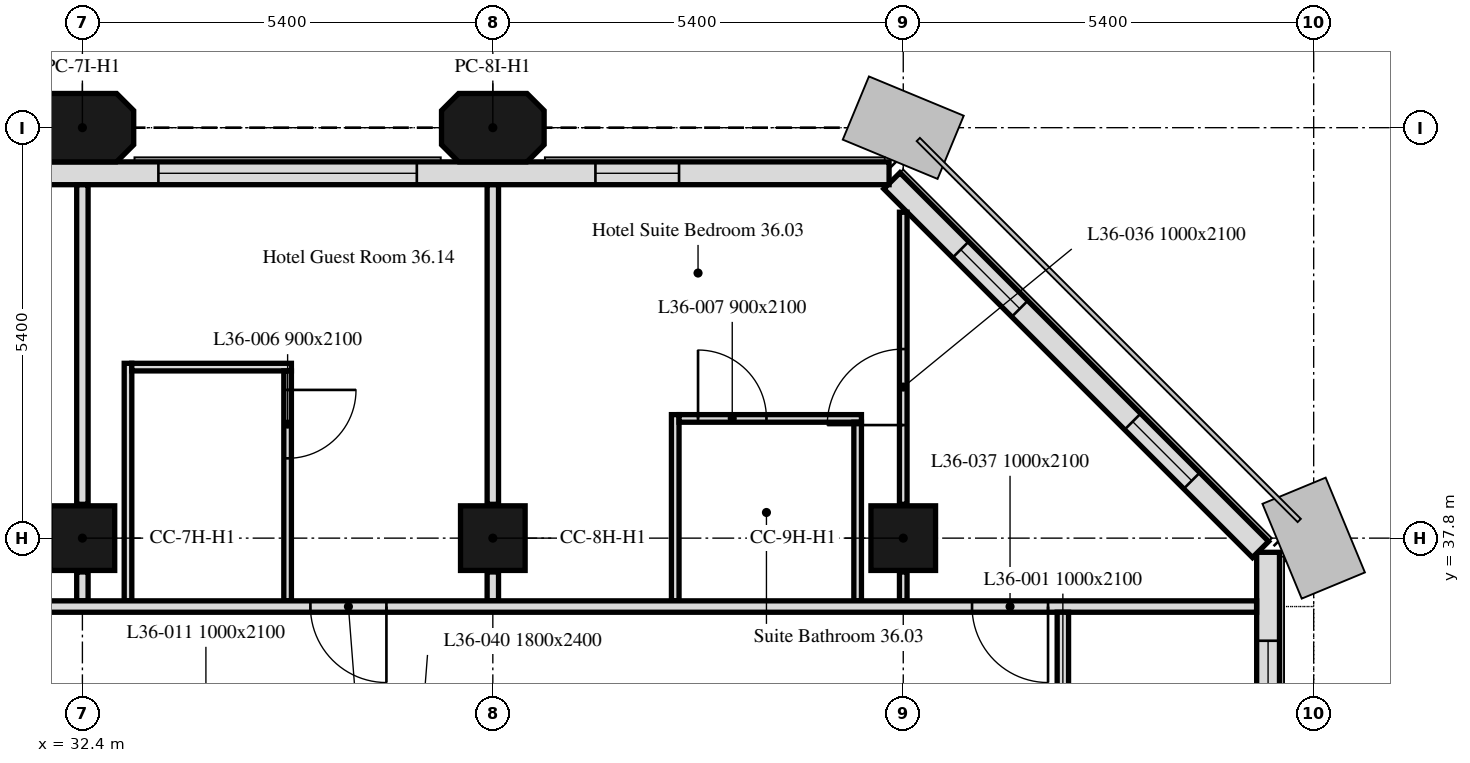
"""IFC4 building model, lengths in metres.
Left out: names, types, materials, properties, quantities, classifications, styles, units other than length and angle.
Written with IfcOpenShell. Run it as: python <this file> out.ifc"""

import sys

from ifc_helpers import new_model, si_unit, direction, frame, frame_2d, origin, origin_2d, place, context, subcontext, project, spatial, polyline, rectangle, outline, extrude, element, fill, save


model = new_model("IFC4")
c1 = context("Model", 3, precision=1e-05, world=origin(), true_north=direction((0.0, 1.0)))
c2 = subcontext(c1, "Body", "Model", "MODEL_VIEW")
j1 = project(units=[si_unit("LENGTHUNIT", "METRE"), si_unit("PLANEANGLEUNIT", "RADIAN")], contexts=[c1])
p1 = place(None, origin())
s1 = spatial("IfcSite", under=j1, at=p1, CompositionType="ELEMENT")
p2 = place(p1, origin())
s2 = spatial("IfcBuilding", under=s1, at=p2, CompositionType="ELEMENT")
p3 = place(p2, frame((0.0, 0.0, 156.1)))
s3 = spatial("IfcBuildingStorey", under=s2, at=p3, CompositionType="ELEMENT", Elevation=156.1)
for number, where, z_axis, x_axis in (
    (1, (32.4, 37.8, 0.0), (0.0, 0.0, 1.0), (1.0, 0.0, 0.0)),
    (2, (37.8, 37.8, 0.0), (0.0, 0.0, 1.0), (1.0, 0.0, 0.0)),
    (3, (43.2, 37.8, 0.0), (0.0, 0.0, 1.0), (1.0, 0.0, 0.0)),
):
    element("IfcColumn", number, at=place(p3, frame(where, z_axis=z_axis, x_axis=x_axis)), inside=s3, PredefinedType="COLUMN", context=c2, shape_type="SweptSolid", body=[
        extrude(rectangle(XDim=0.85, YDim=0.85, at=origin_2d()), origin(), (0.0, 0.0, 1.0), 3.0),
    ])
for number, where, z_axis, x_axis in (
    (4, (32.4, 43.2, 0.0), (0.0, 0.0, 1.0), (1.0, 0.0, 0.0)),
    (5, (37.8, 43.2, 0.0), (0.0, 0.0, 1.0), (1.0, 0.0, 0.0)),
):
    element("IfcColumn", number, at=place(p3, frame(where, z_axis=z_axis, x_axis=x_axis)), inside=s3, PredefinedType="COLUMN", context=c2, shape_type="SweptSolid", body=[
        extrude(outline(polyline([(-0.45, -0.45), (0.45, -0.45), (0.675, -0.225), (0.675, 0.225), (0.45, 0.45), (-0.45, 0.45), (-0.675, 0.225), (-0.675, -0.225), (-0.45, -0.45)])), origin(), (0.0, 0.0, 1.0), 3.0),
    ])
p4 = place(p3, frame((48.0, 5.586, 0.0), z_axis=(0.0, 0.0, 1.0), x_axis=(0.0, 1.0, 0.0)))
e6 = element("IfcWall", 6, at=p4, inside=s3, PredefinedType="SOLIDWALL", context=c2, shape_type="SweptSolid", body=[
    extrude(rectangle(XDim=32.027, YDim=0.3, at=frame_2d((16.014, 0.0))), origin(), (0.0, 0.0, 1.0), 3.0),
])
p5 = place(p4, frame((1.789, 0.0, 0.9)))
e7 = element("IfcOpeningElement", 7, at=p5, cuts=e6, PredefinedType="OPENING", context=c2, shape_type="SweptSolid", body=[
    extrude(rectangle(XDim=0.65, YDim=1.7, at=frame_2d((0.325, 0.85))), frame((0.0, 0.16, 0.0), z_axis=(0.0, -1.0, 0.0), x_axis=(1.0, 0.0, 0.0)), (0.0, 0.0, 1.0), 0.32),
])
p6 = place(p4, frame((2.764, 0.0, 0.9)))
e8 = element("IfcOpeningElement", 8, at=p6, cuts=e6, PredefinedType="OPENING", context=c2, shape_type="SweptSolid", body=[
    extrude(rectangle(XDim=1.1, YDim=1.7, at=frame_2d((0.55, 0.85))), frame((0.0, 0.16, 0.0), z_axis=(0.0, -1.0, 0.0), x_axis=(1.0, 0.0, 0.0)), (0.0, 0.0, 1.0), 0.32),
])
p7 = place(p4, frame((6.214, 0.0, 0.9)))
e9 = element("IfcOpeningElement", 9, at=p7, cuts=e6, PredefinedType="OPENING", context=c2, shape_type="SweptSolid", body=[
    extrude(rectangle(XDim=3.4, YDim=1.7, at=frame_2d((1.7, 0.85))), frame((0.0, 0.16, 0.0), z_axis=(0.0, -1.0, 0.0), x_axis=(1.0, 0.0, 0.0)), (0.0, 0.0, 1.0), 0.32),
])
p8 = place(p4, frame((11.964, 0.0, 0.9)))
e10 = element("IfcOpeningElement", 10, at=p8, cuts=e6, PredefinedType="OPENING", context=c2, shape_type="SweptSolid", body=[
    extrude(rectangle(XDim=1.1, YDim=1.7, at=frame_2d((0.55, 0.85))), frame((0.0, 0.16, 0.0), z_axis=(0.0, -1.0, 0.0), x_axis=(1.0, 0.0, 0.0)), (0.0, 0.0, 1.0), 0.32),
])
p9 = place(p4, frame((13.564, 0.0, 0.9)))
e11 = element("IfcOpeningElement", 11, at=p9, cuts=e6, PredefinedType="OPENING", context=c2, shape_type="SweptSolid", body=[
    extrude(rectangle(XDim=1.1, YDim=1.7, at=frame_2d((0.55, 0.85))), frame((0.0, 0.16, 0.0), z_axis=(0.0, -1.0, 0.0), x_axis=(1.0, 0.0, 0.0)), (0.0, 0.0, 1.0), 0.32),
])
p10 = place(p4, frame((17.364, 0.0, 0.9)))
e12 = element("IfcOpeningElement", 12, at=p10, cuts=e6, PredefinedType="OPENING", context=c2, shape_type="SweptSolid", body=[
    extrude(rectangle(XDim=1.1, YDim=1.7, at=frame_2d((0.55, 0.85))), frame((0.0, 0.16, 0.0), z_axis=(0.0, -1.0, 0.0), x_axis=(1.0, 0.0, 0.0)), (0.0, 0.0, 1.0), 0.32),
])
p11 = place(p4, frame((18.964, 0.0, 0.9)))
e13 = element("IfcOpeningElement", 13, at=p11, cuts=e6, PredefinedType="OPENING", context=c2, shape_type="SweptSolid", body=[
    extrude(rectangle(XDim=1.1, YDim=1.7, at=frame_2d((0.55, 0.85))), frame((0.0, 0.16, 0.0), z_axis=(0.0, -1.0, 0.0), x_axis=(1.0, 0.0, 0.0)), (0.0, 0.0, 1.0), 0.32),
])
p12 = place(p4, frame((22.764, 0.0, 0.9)))
e14 = element("IfcOpeningElement", 14, at=p12, cuts=e6, PredefinedType="OPENING", context=c2, shape_type="SweptSolid", body=[
    extrude(rectangle(XDim=1.1, YDim=1.7, at=frame_2d((0.55, 0.85))), frame((0.0, 0.16, 0.0), z_axis=(0.0, -1.0, 0.0), x_axis=(1.0, 0.0, 0.0)), (0.0, 0.0, 1.0), 0.32),
])
p13 = place(p4, frame((24.364, 0.0, 0.9)))
e15 = element("IfcOpeningElement", 15, at=p13, cuts=e6, PredefinedType="OPENING", context=c2, shape_type="SweptSolid", body=[
    extrude(rectangle(XDim=1.1, YDim=1.7, at=frame_2d((0.55, 0.85))), frame((0.0, 0.16, 0.0), z_axis=(0.0, -1.0, 0.0), x_axis=(1.0, 0.0, 0.0)), (0.0, 0.0, 1.0), 0.32),
])
p14 = place(p4, frame((28.164, 0.0, 0.9)))
e16 = element("IfcOpeningElement", 16, at=p14, cuts=e6, PredefinedType="OPENING", context=c2, shape_type="SweptSolid", body=[
    extrude(rectangle(XDim=1.1, YDim=1.7, at=frame_2d((0.55, 0.85))), frame((0.0, 0.16, 0.0), z_axis=(0.0, -1.0, 0.0), x_axis=(1.0, 0.0, 0.0)), (0.0, 0.0, 1.0), 0.32),
])
p15 = place(p4, frame((29.764, 0.0, 0.9)))
e17 = element("IfcOpeningElement", 17, at=p15, cuts=e6, PredefinedType="OPENING", context=c2, shape_type="SweptSolid", body=[
    extrude(rectangle(XDim=1.1, YDim=1.7, at=frame_2d((0.55, 0.85))), frame((0.0, 0.16, 0.0), z_axis=(0.0, -1.0, 0.0), x_axis=(1.0, 0.0, 0.0)), (0.0, 0.0, 1.0), 0.32),
])
p16 = place(p3, frame((47.901, 37.65, 0.0), z_axis=(0.0, 0.0, 1.0), x_axis=(-0.707106781187, 0.707106781187, 0.0)))
e18 = element("IfcWall", 18, at=p16, inside=s3, PredefinedType="SOLIDWALL", context=c2, shape_type="SweptSolid", body=[
    extrude(rectangle(XDim=6.86, YDim=0.3, at=frame_2d((3.43, 0.0))), origin(), (0.0, 0.0, 1.0), 3.0),
])
p17 = place(p16, frame((1.28, 0.0, 0.9)))
e19 = element("IfcOpeningElement", 19, at=p17, cuts=e18, PredefinedType="OPENING", context=c2, shape_type="SweptSolid", body=[
    extrude(rectangle(XDim=1.1, YDim=1.7, at=frame_2d((0.55, 0.85))), frame((0.0, 0.16, 0.0), z_axis=(0.0, -1.0, 0.0), x_axis=(1.0, 0.0, 0.0)), (0.0, 0.0, 1.0), 0.32),
])
p18 = place(p16, frame((4.48, 0.0, 0.9)))
e20 = element("IfcOpeningElement", 20, at=p18, cuts=e18, PredefinedType="OPENING", context=c2, shape_type="SweptSolid", body=[
    extrude(rectangle(XDim=1.1, YDim=1.7, at=frame_2d((0.55, 0.85))), frame((0.0, 0.16, 0.0), z_axis=(0.0, -1.0, 0.0), x_axis=(1.0, 0.0, 0.0)), (0.0, 0.0, 1.0), 0.32),
])
p19 = place(p3, frame((43.014, 42.6, 0.0), z_axis=(0.0, 0.0, 1.0), x_axis=(-1.0, 0.0, 0.0)))
e21 = element("IfcWall", 21, at=p19, inside=s3, PredefinedType="SOLIDWALL", context=c2, shape_type="SweptSolid", body=[
    extrude(rectangle(XDim=32.027, YDim=0.3, at=frame_2d((16.014, 0.0))), origin(), (0.0, 0.0, 1.0), 3.0),
])
p20 = place(p19, frame((2.764, 0.0, 0.9)))
e22 = element("IfcOpeningElement", 22, at=p20, cuts=e21, PredefinedType="OPENING", context=c2, shape_type="SweptSolid", body=[
    extrude(rectangle(XDim=1.1, YDim=1.7, at=frame_2d((0.55, 0.85))), frame((0.0, 0.16, 0.0), z_axis=(0.0, -1.0, 0.0), x_axis=(1.0, 0.0, 0.0)), (0.0, 0.0, 1.0), 0.32),
])
p21 = place(p19, frame((6.214, 0.0, 0.9)))
e23 = element("IfcOpeningElement", 23, at=p21, cuts=e21, PredefinedType="OPENING", context=c2, shape_type="SweptSolid", body=[
    extrude(rectangle(XDim=3.4, YDim=1.7, at=frame_2d((1.7, 0.85))), frame((0.0, 0.16, 0.0), z_axis=(0.0, -1.0, 0.0), x_axis=(1.0, 0.0, 0.0)), (0.0, 0.0, 1.0), 0.32),
])
p22 = place(p19, frame((13.564, 0.0, 0.9)))
e24 = element("IfcOpeningElement", 24, at=p22, cuts=e21, PredefinedType="OPENING", context=c2, shape_type="SweptSolid", body=[
    extrude(rectangle(XDim=1.1, YDim=1.7, at=frame_2d((0.55, 0.85))), frame((0.0, 0.16, 0.0), z_axis=(0.0, -1.0, 0.0), x_axis=(1.0, 0.0, 0.0)), (0.0, 0.0, 1.0), 0.32),
])
p23 = place(p19, frame((17.014, 0.0, 0.9)))
e25 = element("IfcOpeningElement", 25, at=p23, cuts=e21, PredefinedType="OPENING", context=c2, shape_type="SweptSolid", body=[
    extrude(rectangle(XDim=3.4, YDim=1.7, at=frame_2d((1.7, 0.85))), frame((0.0, 0.16, 0.0), z_axis=(0.0, -1.0, 0.0), x_axis=(1.0, 0.0, 0.0)), (0.0, 0.0, 1.0), 0.32),
])
p24 = place(p19, frame((24.364, 0.0, 0.9)))
e26 = element("IfcOpeningElement", 26, at=p24, cuts=e21, PredefinedType="OPENING", context=c2, shape_type="SweptSolid", body=[
    extrude(rectangle(XDim=1.1, YDim=1.7, at=frame_2d((0.55, 0.85))), frame((0.0, 0.16, 0.0), z_axis=(0.0, -1.0, 0.0), x_axis=(1.0, 0.0, 0.0)), (0.0, 0.0, 1.0), 0.32),
])
p25 = place(p19, frame((27.814, 0.0, 0.9)))
e27 = element("IfcOpeningElement", 27, at=p25, cuts=e21, PredefinedType="OPENING", context=c2, shape_type="SweptSolid", body=[
    extrude(rectangle(XDim=3.4, YDim=1.7, at=frame_2d((1.7, 0.85))), frame((0.0, 0.16, 0.0), z_axis=(0.0, -1.0, 0.0), x_axis=(1.0, 0.0, 0.0)), (0.0, 0.0, 1.0), 0.32),
])
p26 = place(p3, frame((32.4, 36.975, 0.0), z_axis=(0.0, 0.0, 1.0), x_axis=(0.0, 1.0, 0.0)))
e28 = element("IfcWall", 28, at=p26, inside=s3, PredefinedType="PARTITIONING", context=c2, shape_type="SweptSolid", body=[
    extrude(rectangle(XDim=0.38, YDim=0.15, at=frame_2d((0.19, 0.0))), origin(), (0.0, 0.0, 1.0), 3.0),
])
p27 = place(p3, frame((32.4, 38.245, 0.0), z_axis=(0.0, 0.0, 1.0), x_axis=(0.0, 1.0, 0.0)))
e29 = element("IfcWall", 29, at=p27, inside=s3, PredefinedType="PARTITIONING", context=c2, shape_type="SweptSolid", body=[
    extrude(rectangle(XDim=4.204, YDim=0.15, at=frame_2d((2.102, 0.0))), origin(), (0.0, 0.0, 1.0), 3.0),
])
p28 = place(p3, frame((33.0, 36.975, 0.0), z_axis=(0.0, 0.0, 1.0), x_axis=(0.0, 1.0, 0.0)))
e30 = element("IfcWall", 30, at=p28, inside=s3, PredefinedType="PARTITIONING", context=c2, shape_type="SweptSolid", body=[
    extrude(rectangle(XDim=3.125, YDim=0.1, at=frame_2d((1.562, 0.0))), origin(), (0.0, 0.0, 1.0), 3.0),
])
p29 = place(p3, frame((33.05, 40.05, 0.0), z_axis=(0.0, 0.0, 1.0), x_axis=(1.0, 0.0, 0.0)))
e31 = element("IfcWall", 31, at=p29, inside=s3, PredefinedType="PARTITIONING", context=c2, shape_type="SweptSolid", body=[
    extrude(rectangle(XDim=2.1, YDim=0.1, at=frame_2d((1.05, 0.0))), origin(), (0.0, 0.0, 1.0), 3.0),
])
p30 = place(p3, frame((35.1, 40.0, 0.0), z_axis=(0.0, 0.0, 1.0), x_axis=(0.0, -1.0, 0.0)))
e32 = element("IfcWall", 32, at=p30, inside=s3, PredefinedType="PARTITIONING", context=c2, shape_type="SweptSolid", body=[
    extrude(rectangle(XDim=3.025, YDim=0.1, at=frame_2d((1.512, 0.0))), origin(), (0.0, 0.0, 1.0), 3.0),
])
p31 = place(p30, frame((0.25, 0.0, 0.0)))
e33 = element("IfcOpeningElement", 33, at=p31, cuts=e32, PredefinedType="OPENING", context=c2, shape_type="SweptSolid", body=[
    extrude(rectangle(XDim=0.9, YDim=2.1, at=frame_2d((0.45, 1.05))), frame((0.0, 0.05, 0.0), z_axis=(0.0, -1.0, 0.0), x_axis=(1.0, 0.0, 0.0)), (0.0, 0.0, 1.0), 0.1),
])
p32 = place(p3, frame((37.8, 36.975, 0.0), z_axis=(0.0, 0.0, 1.0), x_axis=(0.0, 1.0, 0.0)))
e34 = element("IfcWall", 34, at=p32, inside=s3, PredefinedType="PARTITIONING", context=c2, shape_type="SweptSolid", body=[
    extrude(rectangle(XDim=0.38, YDim=0.15, at=frame_2d((0.19, 0.0))), origin(), (0.0, 0.0, 1.0), 3.0),
])
p33 = place(p3, frame((37.8, 38.245, 0.0), z_axis=(0.0, 0.0, 1.0), x_axis=(0.0, 1.0, 0.0)))
e35 = element("IfcWall", 35, at=p33, inside=s3, PredefinedType="PARTITIONING", context=c2, shape_type="SweptSolid", body=[
    extrude(rectangle(XDim=4.204, YDim=0.15, at=frame_2d((2.102, 0.0))), origin(), (0.0, 0.0, 1.0), 3.0),
])
p34 = place(p3, frame((40.2, 36.975, 0.0), z_axis=(0.0, 0.0, 1.0), x_axis=(0.0, 1.0, 0.0)))
e36 = element("IfcWall", 36, at=p34, inside=s3, PredefinedType="PARTITIONING", context=c2, shape_type="SweptSolid", body=[
    extrude(rectangle(XDim=2.45, YDim=0.1, at=frame_2d((1.225, 0.0))), origin(), (0.0, 0.0, 1.0), 3.0),
])
p35 = place(p3, frame((40.25, 39.375, 0.0), z_axis=(0.0, 0.0, 1.0), x_axis=(1.0, 0.0, 0.0)))
e37 = element("IfcWall", 37, at=p35, inside=s3, PredefinedType="PARTITIONING", context=c2, shape_type="SweptSolid", body=[
    extrude(rectangle(XDim=2.4, YDim=0.1, at=frame_2d((1.2, 0.0))), origin(), (0.0, 0.0, 1.0), 3.0),
])
p36 = place(p35, frame((0.25, 0.0, 0.0)))
e38 = element("IfcOpeningElement", 38, at=p36, cuts=e37, PredefinedType="OPENING", context=c2, shape_type="SweptSolid", body=[
    extrude(rectangle(XDim=0.9, YDim=2.1, at=frame_2d((0.45, 1.05))), frame((0.0, 0.05, 0.0), z_axis=(0.0, -1.0, 0.0), x_axis=(1.0, 0.0, 0.0)), (0.0, 0.0, 1.0), 0.1),
])
p37 = place(p3, frame((42.6, 39.325, 0.0), z_axis=(0.0, 0.0, 1.0), x_axis=(0.0, -1.0, 0.0)))
e39 = element("IfcWall", 39, at=p37, inside=s3, PredefinedType="PARTITIONING", context=c2, shape_type="SweptSolid", body=[
    extrude(rectangle(XDim=2.35, YDim=0.1, at=frame_2d((1.175, 0.0))), origin(), (0.0, 0.0, 1.0), 3.0),
])
p38 = place(p3, frame((43.2, 36.975, 0.0), z_axis=(0.0, 0.0, 1.0), x_axis=(0.0, 1.0, 0.0)))
e40 = element("IfcWall", 40, at=p38, inside=s3, PredefinedType="PARTITIONING", context=c2, shape_type="SweptSolid", body=[
    extrude(rectangle(XDim=0.38, YDim=0.1, at=frame_2d((0.19, 0.0))), origin(), (0.0, 0.0, 1.0), 3.0),
])
p39 = place(p3, frame((43.2, 38.245, 0.0), z_axis=(0.0, 0.0, 1.0), x_axis=(0.0, 1.0, 0.0)))
e41 = element("IfcWall", 41, at=p39, inside=s3, PredefinedType="PARTITIONING", context=c2, shape_type="SweptSolid", body=[
    extrude(rectangle(XDim=3.843, YDim=0.1, at=frame_2d((1.921, 0.0))), origin(), (0.0, 0.0, 1.0), 3.0),
])
p40 = place(p39, frame((1.042, 0.0, 0.0)))
e42 = element("IfcOpeningElement", 42, at=p40, cuts=e41, PredefinedType="OPENING", context=c2, shape_type="SweptSolid", body=[
    extrude(rectangle(XDim=1.0, YDim=2.1, at=frame_2d((0.5, 1.05))), frame((0.0, 0.05, 0.0), z_axis=(0.0, -1.0, 0.0), x_axis=(1.0, 0.0, 0.0)), (0.0, 0.0, 1.0), 0.1),
])
p41 = place(p3, frame((47.849, 36.9, 0.0), z_axis=(0.0, 0.0, 1.0), x_axis=(-1.0, 0.0, 0.0)))
e43 = element("IfcWall", 43, at=p41, inside=s3, PredefinedType="PARTITIONING", context=c2, shape_type="SweptSolid", body=[
    extrude(rectangle(XDim=41.698, YDim=0.15, at=frame_2d((20.849, 0.0))), origin(), (0.0, 0.0, 1.0), 3.0),
])
p42 = place(p41, frame((39.249, 0.0, 0.0)))
e44 = element("IfcOpeningElement", 44, at=p42, cuts=e43, PredefinedType="OPENING", context=c2, shape_type="SweptSolid", body=[
    extrude(rectangle(XDim=1.0, YDim=2.1, at=frame_2d((0.5, 1.05))), frame((0.0, 0.075, 0.0), z_axis=(0.0, -1.0, 0.0), x_axis=(1.0, 0.0, 0.0)), (0.0, 0.0, 1.0), 0.15),
])
p43 = place(p41, frame((27.649, 0.0, 0.0)))
e45 = element("IfcOpeningElement", 45, at=p43, cuts=e43, PredefinedType="OPENING", context=c2, shape_type="SweptSolid", body=[
    extrude(rectangle(XDim=1.0, YDim=2.1, at=frame_2d((0.5, 1.05))), frame((0.0, 0.075, 0.0), z_axis=(0.0, -1.0, 0.0), x_axis=(1.0, 0.0, 0.0)), (0.0, 0.0, 1.0), 0.15),
])
p44 = place(p41, frame((22.249, 0.0, 0.0)))
e46 = element("IfcOpeningElement", 46, at=p44, cuts=e43, PredefinedType="OPENING", context=c2, shape_type="SweptSolid", body=[
    extrude(rectangle(XDim=1.0, YDim=2.1, at=frame_2d((0.5, 1.05))), frame((0.0, 0.075, 0.0), z_axis=(0.0, -1.0, 0.0), x_axis=(1.0, 0.0, 0.0)), (0.0, 0.0, 1.0), 0.15),
])
p45 = place(p41, frame((16.849, 0.0, 0.0)))
e47 = element("IfcOpeningElement", 47, at=p45, cuts=e43, PredefinedType="OPENING", context=c2, shape_type="SweptSolid", body=[
    extrude(rectangle(XDim=1.0, YDim=2.1, at=frame_2d((0.5, 1.05))), frame((0.0, 0.075, 0.0), z_axis=(0.0, -1.0, 0.0), x_axis=(1.0, 0.0, 0.0)), (0.0, 0.0, 1.0), 0.15),
])
p46 = place(p41, frame((11.449, 0.0, 0.0)))
e48 = element("IfcOpeningElement", 48, at=p46, cuts=e43, PredefinedType="OPENING", context=c2, shape_type="SweptSolid", body=[
    extrude(rectangle(XDim=1.0, YDim=2.1, at=frame_2d((0.5, 1.05))), frame((0.0, 0.075, 0.0), z_axis=(0.0, -1.0, 0.0), x_axis=(1.0, 0.0, 0.0)), (0.0, 0.0, 1.0), 0.15),
])
p47 = place(p41, frame((2.744, 0.0, 0.0)))
e49 = element("IfcOpeningElement", 49, at=p47, cuts=e43, PredefinedType="OPENING", context=c2, shape_type="SweptSolid", body=[
    extrude(rectangle(XDim=1.0, YDim=2.1, at=frame_2d((0.5, 1.05))), frame((0.0, 0.075, 0.0), z_axis=(0.0, -1.0, 0.0), x_axis=(1.0, 0.0, 0.0)), (0.0, 0.0, 1.0), 0.15),
])
p48 = place(p3, frame((45.3, 36.825, 0.0), z_axis=(0.0, 0.0, 1.0), x_axis=(0.0, -1.0, 0.0)))
e50 = element("IfcWall", 50, at=p48, inside=s3, PredefinedType="PARTITIONING", context=c2, shape_type="SweptSolid", body=[
    extrude(rectangle(XDim=15.15, YDim=0.15, at=frame_2d((7.575, 0.0))), origin(), (0.0, 0.0, 1.0), 2.4),
])
p49 = place(p48, frame((1.675, 0.0, 0.0)))
e51 = element("IfcOpeningElement", 51, at=p49, cuts=e50, PredefinedType="OPENING", context=c2, shape_type="SweptSolid", body=[
    extrude(rectangle(XDim=1.0, YDim=2.1, at=frame_2d((0.5, 1.05))), frame((0.0, 0.075, 0.0), z_axis=(0.0, -1.0, 0.0), x_axis=(1.0, 0.0, 0.0)), (0.0, 0.0, 1.0), 0.15),
])
p50 = place(p48, frame((7.975, 0.0, 0.0)))
e52 = element("IfcOpeningElement", 52, at=p50, cuts=e50, PredefinedType="OPENING", context=c2, shape_type="SweptSolid", body=[
    extrude(rectangle(XDim=1.0, YDim=2.1, at=frame_2d((0.5, 1.05))), frame((0.0, 0.075, 0.0), z_axis=(0.0, -1.0, 0.0), x_axis=(1.0, 0.0, 0.0)), (0.0, 0.0, 1.0), 0.15),
])
p51 = place(p15, origin())
e53 = element("IfcWindow", 53, at=p51, inside=s3, PartitioningType="SINGLE_PANEL", PredefinedType="WINDOW", context=c2, shape_type="SweptSolid", body=[
    extrude(rectangle(XDim=1.1, YDim=1.7, at=frame_2d((0.55, 0.85))), frame((0.0, 0.03, 0.0), z_axis=(0.0, -1.0, 0.0), x_axis=(1.0, 0.0, 0.0)), (0.0, 0.0, 1.0), 0.06),
])
fill(e17, e53)
p52 = place(p17, origin())
e54 = element("IfcWindow", 54, at=p52, inside=s3, PartitioningType="SINGLE_PANEL", PredefinedType="WINDOW", context=c2, shape_type="SweptSolid", body=[
    extrude(rectangle(XDim=1.1, YDim=1.7, at=frame_2d((0.55, 0.85))), frame((0.0, 0.03, 0.0), z_axis=(0.0, -1.0, 0.0), x_axis=(1.0, 0.0, 0.0)), (0.0, 0.0, 1.0), 0.06),
])
fill(e19, e54)
p53 = place(p18, origin())
e55 = element("IfcWindow", 55, at=p53, inside=s3, PartitioningType="SINGLE_PANEL", PredefinedType="WINDOW", context=c2, shape_type="SweptSolid", body=[
    extrude(rectangle(XDim=1.1, YDim=1.7, at=frame_2d((0.55, 0.85))), frame((0.0, 0.03, 0.0), z_axis=(0.0, -1.0, 0.0), x_axis=(1.0, 0.0, 0.0)), (0.0, 0.0, 1.0), 0.06),
])
fill(e20, e55)
p54 = place(p20, origin())
e56 = element("IfcWindow", 56, at=p54, inside=s3, PartitioningType="SINGLE_PANEL", PredefinedType="WINDOW", context=c2, shape_type="SweptSolid", body=[
    extrude(rectangle(XDim=1.1, YDim=1.7, at=frame_2d((0.55, 0.85))), frame((0.0, 0.03, 0.0), z_axis=(0.0, -1.0, 0.0), x_axis=(1.0, 0.0, 0.0)), (0.0, 0.0, 1.0), 0.06),
])
fill(e22, e56)
p55 = place(p21, origin())
e57 = element("IfcWindow", 57, at=p55, inside=s3, PartitioningType="SINGLE_PANEL", PredefinedType="WINDOW", context=c2, shape_type="SweptSolid", body=[
    extrude(rectangle(XDim=3.4, YDim=1.7, at=frame_2d((1.7, 0.85))), frame((0.0, 0.03, 0.0), z_axis=(0.0, -1.0, 0.0), x_axis=(1.0, 0.0, 0.0)), (0.0, 0.0, 1.0), 0.06),
])
fill(e23, e57)
p56 = place(p31, origin())
e58 = element("IfcDoor", 58, at=p56, inside=s3, OperationType="SINGLE_SWING_RIGHT", PredefinedType="DOOR", context=c2, shape_type="SweptSolid", body=[
    extrude(rectangle(XDim=0.9, YDim=2.1, at=frame_2d((0.45, 1.05))), frame((0.0, 0.025, 0.0), z_axis=(0.0, -1.0, 0.0), x_axis=(1.0, 0.0, 0.0)), (0.0, 0.0, 1.0), 0.05),
])
fill(e33, e58)
p57 = place(p36, origin())
e59 = element("IfcDoor", 59, at=p57, inside=s3, OperationType="SINGLE_SWING_RIGHT", PredefinedType="DOOR", context=c2, shape_type="SweptSolid", body=[
    extrude(rectangle(XDim=0.9, YDim=2.1, at=frame_2d((0.45, 1.05))), frame((0.0, 0.025, 0.0), z_axis=(0.0, -1.0, 0.0), x_axis=(1.0, 0.0, 0.0)), (0.0, 0.0, 1.0), 0.05),
])
fill(e38, e59)
p58 = place(p46, origin())
e60 = element("IfcDoor", 60, at=p58, inside=s3, OperationType="SINGLE_SWING_RIGHT", PredefinedType="DOOR", context=c2, shape_type="SweptSolid", body=[
    extrude(rectangle(XDim=1.0, YDim=2.1, at=frame_2d((0.5, 1.05))), frame((0.0, 0.025, 0.0), z_axis=(0.0, -1.0, 0.0), x_axis=(1.0, 0.0, 0.0)), (0.0, 0.0, 1.0), 0.05),
])
fill(e48, e60)
p59 = place(p40, origin())
e61 = element("IfcDoor", 61, at=p59, inside=s3, OperationType="SINGLE_SWING_RIGHT", PredefinedType="DOOR", context=c2, shape_type="SweptSolid", body=[
    extrude(rectangle(XDim=1.0, YDim=2.1, at=frame_2d((0.5, 1.05))), frame((0.0, 0.025, 0.0), z_axis=(0.0, -1.0, 0.0), x_axis=(1.0, 0.0, 0.0)), (0.0, 0.0, 1.0), 0.05),
])
fill(e42, e61)
p60 = place(p47, origin())
e62 = element("IfcDoor", 62, at=p60, inside=s3, OperationType="SINGLE_SWING_RIGHT", PredefinedType="DOOR", context=c2, shape_type="SweptSolid", body=[
    extrude(rectangle(XDim=1.0, YDim=2.1, at=frame_2d((0.5, 1.05))), frame((0.0, 0.025, 0.0), z_axis=(0.0, -1.0, 0.0), x_axis=(1.0, 0.0, 0.0)), (0.0, 0.0, 1.0), 0.05),
])
fill(e49, e62)
save(model, sys.argv[1])
